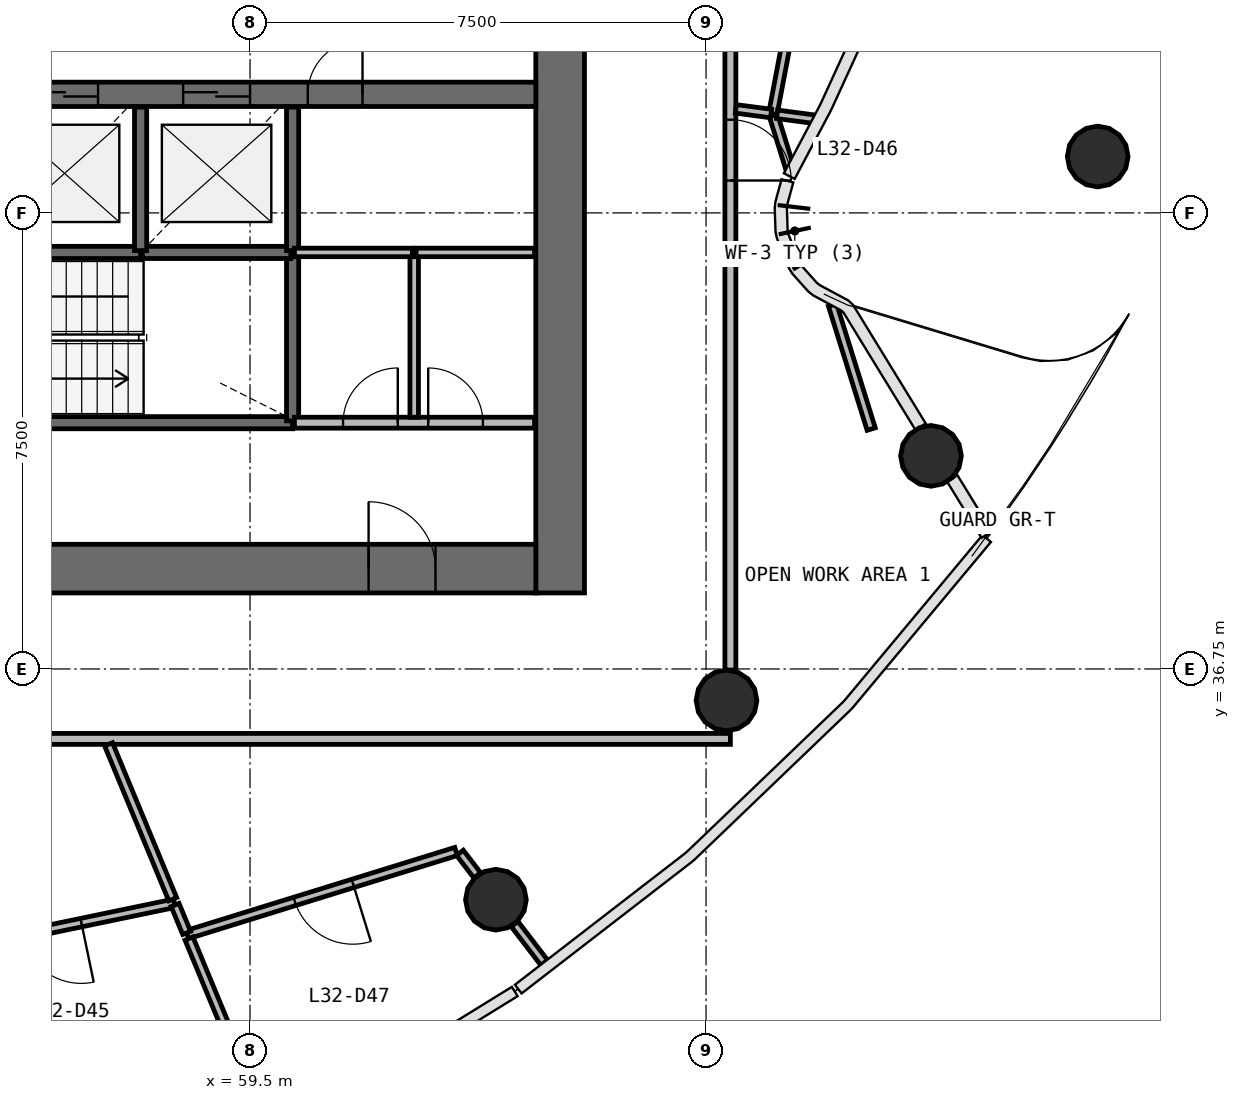
"""IFC4 building model, lengths in metres.
Left out: names, types, materials, properties, quantities, classifications, styles, units other than length and angle.
Written with IfcOpenShell. Run it as: python <this file> out.ifc"""

import sys

from ifc_helpers import new_model, si_unit, direction, frame, frame_2d, origin, origin_2d, place, context, subcontext, project, spatial, rectangle, circle, extrude, source, transform, mapped, element, fill, save


model = new_model("IFC4")
c1 = context("Model", 3, precision=1e-05, world=origin(), true_north=direction((0.0, 1.0)))
c2 = subcontext(c1, "Body", "Model", "MODEL_VIEW")
j1 = project(units=[si_unit("LENGTHUNIT", "METRE"), si_unit("PLANEANGLEUNIT", "RADIAN")], contexts=[c1])
p1 = place(None, origin())
s1 = spatial("IfcSite", under=j1, at=p1, CompositionType="ELEMENT")
p2 = place(p1, origin())
s2 = spatial("IfcBuilding", under=s1, at=p2, CompositionType="ELEMENT")
p3 = place(p2, frame((0.0, 0.0, 137.0)))
s3 = spatial("IfcBuildingStorey", under=s2, at=p3, CompositionType="ELEMENT", Elevation=137.0)
p4 = place(p3, frame((64.6, 38.0, 0.0), z_axis=(0.0, 0.0, 1.0), x_axis=(0.0, 1.0, 0.0)))
e1 = element("IfcWall", 1, at=p4, inside=s3, PredefinedType="SHEAR", context=c2, shape_type="SweptSolid", body=[
    extrude(rectangle(XDim=20.0, YDim=0.8, at=frame_2d((10.0, 0.0))), origin(), (0.0, 0.0, 1.0), 3.9),
])
p5 = place(p4, frame((9.1, 0.0, 0.0)))
e2 = element("IfcOpeningElement", 2, at=p5, cuts=e1, PredefinedType="OPENING", context=c2, shape_type="SweptSolid", body=[
    extrude(rectangle(XDim=1.8, YDim=2.1, at=frame_2d((0.9, 1.05))), frame((0.0, 0.41, 0.0), z_axis=(0.0, -1.0, 0.0), x_axis=(1.0, 0.0, 0.0)), (0.0, 0.0, 1.0), 0.82),
])
p6 = place(p3, frame((39.8, 38.4, 0.0), z_axis=(0.0, 0.0, 1.0), x_axis=(1.0, 0.0, 0.0)))
e3 = element("IfcWall", 3, at=p6, inside=s3, PredefinedType="SHEAR", context=c2, shape_type="SweptSolid", body=[
    extrude(rectangle(XDim=24.4, YDim=0.8, at=frame_2d((12.2, 0.0))), origin(), (0.0, 0.0, 1.0), 3.9),
])
p7 = place(p6, frame((21.65, 0.0, 0.0)))
e4 = element("IfcOpeningElement", 4, at=p7, cuts=e3, PredefinedType="OPENING", context=c2, shape_type="SweptSolid", body=[
    extrude(rectangle(XDim=1.1, YDim=2.1, at=frame_2d((0.55, 1.05))), frame((0.0, 0.41, 0.0), z_axis=(0.0, -1.0, 0.0), x_axis=(1.0, 0.0, 0.0)), (0.0, 0.0, 1.0), 0.82),
])
p8 = place(p6, frame((2.15, 0.0, 0.0)))
e5 = element("IfcOpeningElement", 5, at=p8, cuts=e3, PredefinedType="OPENING", context=c2, shape_type="SweptSolid", body=[
    extrude(rectangle(XDim=1.1, YDim=2.1, at=frame_2d((0.55, 1.05))), frame((0.0, 0.41, 0.0), z_axis=(0.0, -1.0, 0.0), x_axis=(1.0, 0.0, 0.0)), (0.0, 0.0, 1.0), 0.82),
])
p9 = place(p3, frame((39.8, 46.2, 0.0), z_axis=(0.0, 0.0, 1.0), x_axis=(1.0, 0.0, 0.0)))
e6 = element("IfcWall", 6, at=p9, inside=s3, PredefinedType="SHEAR", context=c2, shape_type="SweptSolid", body=[
    extrude(rectangle(XDim=24.4, YDim=0.4, at=frame_2d((12.2, 0.0))), origin(), (0.0, 0.0, 1.0), 3.9),
])
p10 = place(p9, frame((13.6, 0.0, 0.0)))
e7 = element("IfcOpeningElement", 7, at=p10, cuts=e6, PredefinedType="OPENING", context=c2, shape_type="SweptSolid", body=[
    extrude(rectangle(XDim=1.1, YDim=2.1, at=frame_2d((0.55, 1.05))), frame((0.0, 0.21, 0.0), z_axis=(0.0, -1.0, 0.0), x_axis=(1.0, 0.0, 0.0)), (0.0, 0.0, 1.0), 0.42),
])
p11 = place(p9, frame((16.1, 0.0, 0.0)))
e8 = element("IfcOpeningElement", 8, at=p11, cuts=e6, PredefinedType="OPENING", context=c2, shape_type="SweptSolid", body=[
    extrude(rectangle(XDim=1.1, YDim=2.1, at=frame_2d((0.55, 1.05))), frame((0.0, 0.21, 0.0), z_axis=(0.0, -1.0, 0.0), x_axis=(1.0, 0.0, 0.0)), (0.0, 0.0, 1.0), 0.42),
])
p12 = place(p9, frame((18.6, 0.0, 0.0)))
e9 = element("IfcOpeningElement", 9, at=p12, cuts=e6, PredefinedType="OPENING", context=c2, shape_type="SweptSolid", body=[
    extrude(rectangle(XDim=1.1, YDim=2.1, at=frame_2d((0.55, 1.05))), frame((0.0, 0.21, 0.0), z_axis=(0.0, -1.0, 0.0), x_axis=(1.0, 0.0, 0.0)), (0.0, 0.0, 1.0), 0.42),
])
p13 = place(p9, frame((20.65, 0.0, 0.0)))
e10 = element("IfcOpeningElement", 10, at=p13, cuts=e6, PredefinedType="OPENING", context=c2, shape_type="SweptSolid", body=[
    extrude(rectangle(XDim=0.9, YDim=2.1, at=frame_2d((0.45, 1.05))), frame((0.0, 0.21, 0.0), z_axis=(0.0, -1.0, 0.0), x_axis=(1.0, 0.0, 0.0)), (0.0, 0.0, 1.0), 0.42),
])
p14 = place(p9, frame((2.85, 0.0, 0.0)))
e11 = element("IfcOpeningElement", 11, at=p14, cuts=e6, PredefinedType="OPENING", context=c2, shape_type="SweptSolid", body=[
    extrude(rectangle(XDim=0.9, YDim=2.1, at=frame_2d((0.45, 1.05))), frame((0.0, 0.21, 0.0), z_axis=(0.0, -1.0, 0.0), x_axis=(1.0, 0.0, 0.0)), (0.0, 0.0, 1.0), 0.42),
])
m1 = source(origin(), c2, "Body", "SweptSolid", [
    extrude(circle(Radius=0.5, at=origin_2d()), origin(), (0.0, 0.0, 1.0), 3.9),
])
for number, where, z_axis, x_axis in (
    (12, (63.544, 32.956, 0.0), (0.0, 0.0, 1.0), (1.0, 0.0, 0.0)),
    (13, (67.336, 36.232, 0.0), (0.0, 0.0, 1.0), (1.0, 0.0, 0.0)),
    (14, (70.699, 40.254, 0.0), (0.0, 0.0, 1.0), (1.0, 0.0, 0.0)),
    (15, (73.441, 45.177, 0.0), (0.0, 0.0, 1.0), (1.0, 0.0, 0.0)),
):
    element("IfcColumn", number, at=place(p3, frame(where, z_axis=z_axis, x_axis=x_axis)), inside=s3, PredefinedType="COLUMN", context=c2, shape_type="MappedRepresentation", body=[
        mapped(m1, transform((0.0, 0.0, 0.0), scale=1.0)),
    ])
p15 = place(p3, frame((53.6, 40.8, 0.0), z_axis=(0.0, 0.0, 1.0), x_axis=(1.0, 0.0, 0.0)))
e16 = element("IfcWall", 16, at=p15, inside=s3, PredefinedType="SOLIDWALL", context=c2, shape_type="SweptSolid", body=[
    extrude(rectangle(XDim=6.6, YDim=0.2, at=frame_2d((3.3, 0.0))), origin(), (0.0, 0.0, 1.0), 3.58),
])
p16 = place(p15, frame((0.3, 0.0, 0.0)))
e17 = element("IfcOpeningElement", 17, at=p16, cuts=e16, PredefinedType="OPENING", context=c2, shape_type="SweptSolid", body=[
    extrude(rectangle(XDim=1.2, YDim=2.1, at=frame_2d((0.6, 1.05))), frame((0.0, 0.11, 0.0), z_axis=(0.0, -1.0, 0.0), x_axis=(1.0, 0.0, 0.0)), (0.0, 0.0, 1.0), 0.22),
])
p17 = place(p3, frame((60.2, 40.83, 0.0), z_axis=(0.0, 0.0, 1.0), x_axis=(0.0, 1.0, 0.0)))
e18 = element("IfcWall", 18, at=p17, inside=s3, PredefinedType="SOLIDWALL", context=c2, shape_type="SweptSolid", body=[
    extrude(rectangle(XDim=2.77, YDim=0.2, at=frame_2d((1.385, 0.0))), origin(), (0.0, 0.0, 1.0), 3.58),
])
p18 = place(p3, frame((55.2, 43.6, 0.0), z_axis=(0.0, 0.0, 1.0), x_axis=(1.0, 0.0, 0.0)))
e19 = element("IfcWall", 19, at=p18, inside=s3, PredefinedType="SOLIDWALL", context=c2, shape_type="SweptSolid", body=[
    extrude(rectangle(XDim=2.5, YDim=0.2, at=frame_2d((1.25, 0.0))), origin(), (0.0, 0.0, 1.0), 3.58),
])
p19 = place(p3, frame((57.73, 43.6, 0.0), z_axis=(0.0, 0.0, 1.0), x_axis=(1.0, 0.0, 0.0)))
e20 = element("IfcWall", 20, at=p19, inside=s3, PredefinedType="SOLIDWALL", context=c2, shape_type="SweptSolid", body=[
    extrude(rectangle(XDim=2.44, YDim=0.2, at=frame_2d((1.22, 0.0))), origin(), (0.0, 0.0, 1.0), 3.58),
])
for number, where, z_axis, x_axis in (
    (21, (57.7, 43.63, 0.0), (0.0, 0.0, 1.0), (0.0, 1.0, 0.0)),
    (22, (60.2, 43.63, 0.0), (0.0, 0.0, 1.0), (0.0, 1.0, 0.0)),
):
    element("IfcWall", number, at=place(p3, frame(where, z_axis=z_axis, x_axis=x_axis)), inside=s3, PredefinedType="SOLIDWALL", context=c2, shape_type="SweptSolid", body=[
        extrude(rectangle(XDim=2.36, YDim=0.2, at=frame_2d((1.18, 0.0))), origin(), (0.0, 0.0, 1.0), 3.58),
    ])
p20 = place(p3, frame((67.4, 35.6, 0.0), z_axis=(0.0, 0.0, 1.0), x_axis=(-1.0, 0.0, 0.0)))
e23 = element("IfcWall", 23, at=p20, inside=s3, PredefinedType="PARTITIONING", context=c2, shape_type="SweptSolid", body=[
    extrude(rectangle(XDim=30.8, YDim=0.18, at=frame_2d((15.4, 0.0))), origin(), (0.0, 0.0, 1.0), 2.88),
])
p21 = place(p20, frame((20.95, 0.0, 0.0)))
e24 = element("IfcOpeningElement", 24, at=p21, cuts=e23, PredefinedType="OPENING", context=c2, shape_type="SweptSolid", body=[
    extrude(rectangle(XDim=1.0, YDim=2.1, at=frame_2d((0.5, 1.05))), frame((0.0, 0.1, 0.0), z_axis=(0.0, -1.0, 0.0), x_axis=(1.0, 0.0, 0.0)), (0.0, 0.0, 1.0), 0.2),
])
p22 = place(p20, frame((14.95, 0.0, 0.0)))
e25 = element("IfcOpeningElement", 25, at=p22, cuts=e23, PredefinedType="OPENING", context=c2, shape_type="SweptSolid", body=[
    extrude(rectangle(XDim=1.0, YDim=2.1, at=frame_2d((0.5, 1.05))), frame((0.0, 0.1, 0.0), z_axis=(0.0, -1.0, 0.0), x_axis=(1.0, 0.0, 0.0)), (0.0, 0.0, 1.0), 0.2),
])
p23 = place(p3, frame((67.4, 60.37, 0.0), z_axis=(0.0, 0.0, 1.0), x_axis=(0.0, -1.0, 0.0)))
e26 = element("IfcWall", 26, at=p23, inside=s3, PredefinedType="PARTITIONING", context=c2, shape_type="SweptSolid", body=[
    extrude(rectangle(XDim=23.638, YDim=0.18, at=frame_2d((11.819, 0.0))), origin(), (0.0, 0.0, 1.0), 2.88),
])
p24 = place(p23, frame((4.587, 0.0, 0.0)))
e27 = element("IfcOpeningElement", 27, at=p24, cuts=e26, PredefinedType="OPENING", context=c2, shape_type="SweptSolid", body=[
    extrude(rectangle(XDim=1.0, YDim=2.1, at=frame_2d((0.5, 1.05))), frame((0.0, 0.1, 0.0), z_axis=(0.0, -1.0, 0.0), x_axis=(1.0, 0.0, 0.0)), (0.0, 0.0, 1.0), 0.2),
])
p25 = place(p23, frame((14.587, 0.0, 0.0)))
e28 = element("IfcOpeningElement", 28, at=p25, cuts=e26, PredefinedType="OPENING", context=c2, shape_type="SweptSolid", body=[
    extrude(rectangle(XDim=1.0, YDim=2.1, at=frame_2d((0.5, 1.05))), frame((0.0, 0.1, 0.0), z_axis=(0.0, -1.0, 0.0), x_axis=(1.0, 0.0, 0.0)), (0.0, 0.0, 1.0), 0.2),
])
p26 = place(p23, frame((11.387, 0.0, 0.0)))
e29 = element("IfcOpeningElement", 29, at=p26, cuts=e26, PredefinedType="OPENING", context=c2, shape_type="SweptSolid", body=[
    extrude(rectangle(XDim=1.0, YDim=2.1, at=frame_2d((0.5, 1.05))), frame((0.0, 0.1, 0.0), z_axis=(0.0, -1.0, 0.0), x_axis=(1.0, 0.0, 0.0)), (0.0, 0.0, 1.0), 0.2),
])
p27 = place(p3, frame((60.23, 40.8, 0.0), z_axis=(0.0, 0.0, 1.0), x_axis=(1.0, 0.0, 0.0)))
e30 = element("IfcWall", 30, at=p27, inside=s3, PredefinedType="PARTITIONING", context=c2, shape_type="SweptSolid", body=[
    extrude(rectangle(XDim=3.95, YDim=0.18, at=frame_2d((1.975, 0.0))), origin(), (0.0, 0.0, 1.0), 2.7),
])
p28 = place(p27, frame((0.8, 0.0, 0.0)))
e31 = element("IfcOpeningElement", 31, at=p28, cuts=e30, PredefinedType="OPENING", context=c2, shape_type="SweptSolid", body=[
    extrude(rectangle(XDim=0.9, YDim=2.1, at=frame_2d((0.45, 1.05))), frame((0.0, 0.1, 0.0), z_axis=(0.0, -1.0, 0.0), x_axis=(1.0, 0.0, 0.0)), (0.0, 0.0, 1.0), 0.2),
])
p29 = place(p27, frame((2.2, 0.0, 0.0)))
e32 = element("IfcOpeningElement", 32, at=p29, cuts=e30, PredefinedType="OPENING", context=c2, shape_type="SweptSolid", body=[
    extrude(rectangle(XDim=0.9, YDim=2.1, at=frame_2d((0.45, 1.05))), frame((0.0, 0.1, 0.0), z_axis=(0.0, -1.0, 0.0), x_axis=(1.0, 0.0, 0.0)), (0.0, 0.0, 1.0), 0.2),
])
p30 = place(p3, frame((62.888, 33.748, 0.0), z_axis=(0.0, 0.0, 1.0), x_axis=(-0.955370687091, -0.295409631272, 0.0)))
e33 = element("IfcWall", 33, at=p30, inside=s3, PredefinedType="PARTITIONING", context=c2, shape_type="SweptSolid", body=[
    extrude(rectangle(XDim=4.626, YDim=0.14, at=frame_2d((2.313, 0.0))), origin(), (0.0, 0.0, 1.0), 2.88),
])
p31 = place(p30, frame((1.776, 0.0, 0.0)))
e34 = element("IfcOpeningElement", 34, at=p31, cuts=e33, PredefinedType="OPENING", context=c2, shape_type="SweptSolid", body=[
    extrude(rectangle(XDim=1.0, YDim=2.1, at=frame_2d((0.5, 1.05))), frame((0.0, 0.08, 0.0), z_axis=(0.0, -1.0, 0.0), x_axis=(1.0, 0.0, 0.0)), (0.0, 0.0, 1.0), 0.16),
])
p32 = place(p3, frame((68.92, 50.199, 0.0), z_axis=(0.0, 0.0, 1.0), x_axis=(-0.186739450269, -0.982409475582, 0.0)))
e35 = element("IfcWall", 35, at=p32, inside=s3, PredefinedType="PARTITIONING", context=c2, shape_type="SweptSolid", body=[
    extrude(rectangle(XDim=4.396, YDim=0.14, at=frame_2d((2.198, 0.0))), origin(), (0.0, 0.0, 1.0), 2.88),
])
p33 = place(p32, frame((1.746, 0.0, 0.0)))
e36 = element("IfcOpeningElement", 36, at=p33, cuts=e35, PredefinedType="OPENING", context=c2, shape_type="SweptSolid", body=[
    extrude(rectangle(XDim=1.0, YDim=2.1, at=frame_2d((0.5, 1.05))), frame((0.0, 0.08, 0.0), z_axis=(0.0, -1.0, 0.0), x_axis=(1.0, 0.0, 0.0)), (0.0, 0.0, 1.0), 0.16),
])
p34 = place(p3, frame((58.256, 32.897, 0.0), z_axis=(0.0, 0.0, 1.0), x_axis=(-0.979114250406, -0.203310808004, 0.0)))
e37 = element("IfcWall", 37, at=p34, inside=s3, PredefinedType="PARTITIONING", context=c2, shape_type="SweptSolid", body=[
    extrude(rectangle(XDim=4.212, YDim=0.14, at=frame_2d((2.106, 0.0))), origin(), (0.0, 0.0, 1.0), 2.88),
])
p35 = place(p34, frame((1.562, 0.0, 0.0)))
e38 = element("IfcOpeningElement", 38, at=p35, cuts=e37, PredefinedType="OPENING", context=c2, shape_type="SweptSolid", body=[
    extrude(rectangle(XDim=1.0, YDim=2.1, at=frame_2d((0.5, 1.05))), frame((0.0, 0.08, 0.0), z_axis=(0.0, -1.0, 0.0), x_axis=(1.0, 0.0, 0.0)), (0.0, 0.0, 1.0), 0.16),
])
p36 = place(p3, frame((58.267, 32.869, 0.0), z_axis=(0.0, 0.0, 1.0), x_axis=(0.382871995511, -0.923801404553, 0.0)))
e39 = element("IfcWall", 39, at=p36, inside=s3, PredefinedType="PARTITIONING", context=c2, shape_type="SweptSolid", body=[
    extrude(rectangle(XDim=0.497, YDim=0.14, at=frame_2d((0.249, 0.0))), origin(), (0.0, 0.0, 1.0), 2.88),
])
p37 = place(p3, frame((57.174, 35.51, 0.0), z_axis=(0.0, 0.0, 1.0), x_axis=(0.382690664401, -0.923876536871, 0.0)))
e40 = element("IfcWall", 40, at=p37, inside=s3, PredefinedType="PARTITIONING", context=c2, shape_type="SweptSolid", body=[
    extrude(rectangle(XDim=2.757, YDim=0.14, at=frame_2d((1.379, 0.0))), origin(), (0.0, 0.0, 1.0), 2.88),
])
p38 = place(p3, frame((62.2, 40.89, 0.0), z_axis=(0.0, 0.0, 1.0), x_axis=(0.0, 1.0, 0.0)))
e41 = element("IfcWall", 41, at=p38, inside=s3, PredefinedType="PARTITIONING", context=c2, shape_type="SweptSolid", body=[
    extrude(rectangle(XDim=2.71, YDim=0.14, at=frame_2d((1.355, 0.0))), origin(), (0.0, 0.0, 1.0), 2.88),
])
p39 = place(p3, frame((58.496, 32.317, 0.0), z_axis=(0.0, 0.0, 1.0), x_axis=(0.382770137499, -0.923843613302, 0.0)))
e42 = element("IfcWall", 42, at=p39, inside=s3, PredefinedType="PARTITIONING", context=c2, shape_type="SweptSolid", body=[
    extrude(rectangle(XDim=1.598, YDim=0.14, at=frame_2d((0.799, 0.0))), origin(), (0.0, 0.0, 1.0), 2.88),
])
p40 = place(p3, frame((69.716, 40.695, 0.0), z_axis=(0.0, 0.0, 1.0), x_axis=(-0.297612160268, 0.954686860735, 0.0)))
e43 = element("IfcWall", 43, at=p40, inside=s3, PredefinedType="PARTITIONING", context=c2, shape_type="SweptSolid", body=[
    extrude(rectangle(XDim=2.139, YDim=0.14, at=frame_2d((1.07, 0.0))), origin(), (0.0, 0.0, 1.0), 2.88),
])
p41 = place(p3, frame((60.23, 43.6, 0.0), z_axis=(0.0, 0.0, 1.0), x_axis=(1.0, 0.0, 0.0)))
e44 = element("IfcWall", 44, at=p41, inside=s3, PredefinedType="PARTITIONING", context=c2, shape_type="SweptSolid", body=[
    extrude(rectangle(XDim=1.94, YDim=0.14, at=frame_2d((0.97, 0.0))), origin(), (0.0, 0.0, 1.0), 2.88),
])
p42 = place(p3, frame((62.23, 43.6, 0.0), z_axis=(0.0, 0.0, 1.0), x_axis=(1.0, 0.0, 0.0)))
e45 = element("IfcWall", 45, at=p42, inside=s3, PredefinedType="PARTITIONING", context=c2, shape_type="SweptSolid", body=[
    extrude(rectangle(XDim=1.95, YDim=0.14, at=frame_2d((0.975, 0.0))), origin(), (0.0, 0.0, 1.0), 2.88),
])
p43 = place(p3, frame((68.374, 45.0, 0.0), z_axis=(0.0, 0.0, 1.0), x_axis=(-0.29777626912, 0.954635686296, 0.0)))
e46 = element("IfcWall", 46, at=p43, inside=s3, PredefinedType="PARTITIONING", context=c2, shape_type="SweptSolid", body=[
    extrude(rectangle(XDim=0.892, YDim=0.14, at=frame_2d((0.446, 0.0))), origin(), (0.0, 0.0, 1.0), 2.88),
])
p44 = place(p3, frame((63.851, 32.555, 0.0), z_axis=(0.0, 0.0, 1.0), x_axis=(0.60864917868, -0.793439460383, 0.0)))
e47 = element("IfcWall", 47, at=p44, inside=s3, PredefinedType="PARTITIONING", context=c2, shape_type="SweptSolid", body=[
    extrude(rectangle(XDim=0.801, YDim=0.14, at=frame_2d((0.4, 0.0))), origin(), (0.0, 0.0, 1.0), 2.88),
])
p45 = place(p3, frame((68.168, 45.871, 0.0), z_axis=(0.0, 0.0, 1.0), x_axis=(0.991464764419, -0.130374924413, 0.0)))
e48 = element("IfcWall", 48, at=p45, inside=s3, PredefinedType="PARTITIONING", context=c2, shape_type="SweptSolid", body=[
    extrude(rectangle(XDim=0.635, YDim=0.14, at=frame_2d((0.317, 0.0))), origin(), (0.0, 0.0, 1.0), 2.88),
])
p46 = place(p3, frame((67.49, 45.961, 0.0), z_axis=(0.0, 0.0, 1.0), x_axis=(0.991467089631, -0.130357240609, 0.0)))
e49 = element("IfcWall", 49, at=p46, inside=s3, PredefinedType="PARTITIONING", context=c2, shape_type="SweptSolid", body=[
    extrude(rectangle(XDim=0.584, YDim=0.14, at=frame_2d((0.292, 0.0))), origin(), (0.0, 0.0, 1.0), 2.88),
])
p47 = place(p3, frame((62.952, 33.727, 0.0), z_axis=(0.0, 0.0, 1.0), x_axis=(0.608727169633, -0.79337962726, 0.0)))
e50 = element("IfcWall", 50, at=p47, inside=s3, PredefinedType="PARTITIONING", context=c2, shape_type="SweptSolid", body=[
    extrude(rectangle(XDim=0.468, YDim=0.14, at=frame_2d((0.234, 0.0))), origin(), (0.0, 0.0, 1.0), 2.88),
])
m2 = source(origin(), c2, "Body", "SweptSolid", [
    extrude(rectangle(XDim=1.1, YDim=2.1, at=frame_2d((0.55, 1.05))), frame((0.0, 0.025, 0.0), z_axis=(0.0, -1.0, 0.0), x_axis=(1.0, 0.0, 0.0)), (0.0, 0.0, 1.0), 0.05),
])
p48 = place(p11, origin())
e51 = element("IfcDoor", 51, at=p48, inside=s3, OperationType="DOUBLE_DOOR_SLIDING", PredefinedType="USERDEFINED", context=c2, shape_type="MappedRepresentation", body=[
    mapped(m2, transform((0.0, 0.0, 0.0), scale=1.0)),
])
fill(e8, e51)
p49 = place(p12, origin())
e52 = element("IfcDoor", 52, at=p49, inside=s3, OperationType="DOUBLE_DOOR_SLIDING", PredefinedType="USERDEFINED", context=c2, shape_type="MappedRepresentation", body=[
    mapped(m2, transform((0.0, 0.0, 0.0), scale=1.0)),
])
fill(e9, e52)
m3 = source(origin(), c2, "Body", "SweptSolid", [
    extrude(rectangle(XDim=1.1, YDim=2.1, at=frame_2d((0.55, 1.05))), frame((0.0, 0.025, 0.0), z_axis=(0.0, -1.0, 0.0), x_axis=(1.0, 0.0, 0.0)), (0.0, 0.0, 1.0), 0.05),
])
p50 = place(p7, origin())
e53 = element("IfcDoor", 53, at=p50, inside=s3, OperationType="SINGLE_SWING_LEFT", PredefinedType="DOOR", context=c2, shape_type="MappedRepresentation", body=[
    mapped(m3, transform((0.0, 0.0, 0.0), scale=1.0)),
])
fill(e4, e53)
m4 = source(origin(), c2, "Body", "SweptSolid", [
    extrude(rectangle(XDim=1.0, YDim=2.1, at=frame_2d((0.5, 1.05))), frame((0.0, 0.025, 0.0), z_axis=(0.0, -1.0, 0.0), x_axis=(1.0, 0.0, 0.0)), (0.0, 0.0, 1.0), 0.05),
])
p51 = place(p35, origin())
e54 = element("IfcDoor", 54, at=p51, inside=s3, OperationType="SINGLE_SWING_LEFT", PredefinedType="DOOR", context=c2, shape_type="MappedRepresentation", body=[
    mapped(m4, transform((0.0, 0.0, 0.0), scale=1.0)),
])
fill(e38, e54)
p52 = place(p25, origin())
e55 = element("IfcDoor", 55, at=p52, inside=s3, OperationType="SINGLE_SWING_RIGHT", PredefinedType="DOOR", context=c2, shape_type="MappedRepresentation", body=[
    mapped(m4, transform((0.0, 0.0, 0.0), scale=1.0)),
])
fill(e28, e55)
p53 = place(p31, origin())
e56 = element("IfcDoor", 56, at=p53, inside=s3, OperationType="SINGLE_SWING_LEFT", PredefinedType="DOOR", context=c2, shape_type="MappedRepresentation", body=[
    mapped(m4, transform((0.0, 0.0, 0.0), scale=1.0)),
])
fill(e34, e56)
m5 = source(origin(), c2, "Body", "SweptSolid", [
    extrude(rectangle(XDim=0.9, YDim=2.1, at=frame_2d((0.45, 1.05))), frame((0.0, 0.025, 0.0), z_axis=(0.0, -1.0, 0.0), x_axis=(1.0, 0.0, 0.0)), (0.0, 0.0, 1.0), 0.05),
])
p54 = place(p13, origin())
e57 = element("IfcDoor", 57, at=p54, inside=s3, OperationType="SINGLE_SWING_RIGHT", PredefinedType="DOOR", context=c2, shape_type="MappedRepresentation", body=[
    mapped(m5, transform((0.0, 0.0, 0.0), scale=1.0)),
])
fill(e10, e57)
p55 = place(p28, origin())
e58 = element("IfcDoor", 58, at=p55, inside=s3, OperationType="SINGLE_SWING_RIGHT", PredefinedType="DOOR", context=c2, shape_type="MappedRepresentation", body=[
    mapped(m5, transform((0.0, 0.0, 0.0), scale=1.0)),
])
fill(e31, e58)
p56 = place(p29, origin())
e59 = element("IfcDoor", 59, at=p56, inside=s3, OperationType="SINGLE_SWING_LEFT", PredefinedType="DOOR", context=c2, shape_type="MappedRepresentation", body=[
    mapped(m5, transform((0.0, 0.0, 0.0), scale=1.0)),
])
fill(e32, e59)
save(model, sys.argv[1])
